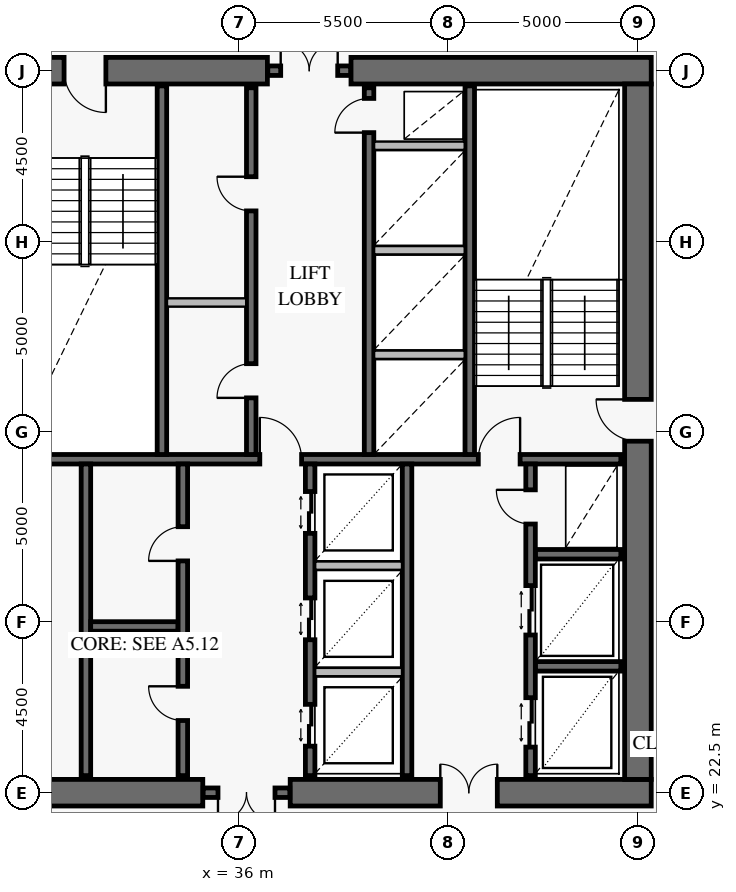
"""IFC4 building model, lengths in metres.
Left out: names, types, materials, properties, quantities, classifications, styles, units other than length and angle.
Written with IfcOpenShell. Run it as: python <this file> out.ifc"""

import sys

from ifc_helpers import new_model, si_unit, direction, frame, frame_2d, origin, place, context, subcontext, project, spatial, rectangle, extrude, element, fill, save


model = new_model("IFC4")
c1 = context("Model", 3, precision=1e-05, world=origin(), true_north=direction((0.0, 1.0)))
c2 = subcontext(c1, "Body", "Model", "MODEL_VIEW")
j1 = project(units=[si_unit("LENGTHUNIT", "METRE"), si_unit("PLANEANGLEUNIT", "RADIAN")], contexts=[c1])
p1 = place(None, origin())
s1 = spatial("IfcSite", under=j1, at=p1, CompositionType="ELEMENT")
p2 = place(p1, origin())
s2 = spatial("IfcBuilding", under=s1, at=p2, CompositionType="ELEMENT")
p3 = place(p2, frame((0.0, 0.0, 218.8)))
s3 = spatial("IfcBuildingStorey", under=s2, at=p3, CompositionType="ELEMENT", Elevation=218.8)
p4 = place(p3, frame((25.15, 22.5, 0.0), z_axis=(0.0, 0.0, 1.0), x_axis=(1.0, 0.0, 0.0)))
e1 = element("IfcWall", 1, at=p4, inside=s3, PredefinedType="SHEAR", context=c2, shape_type="SweptSolid", body=[
    extrude(rectangle(XDim=9.9, YDim=0.7, at=frame_2d((4.95, 0.0))), origin(), (0.0, 0.0, 1.0), 3.8),
])
p5 = place(p4, frame((4.25, 0.0, 0.0)))
e2 = element("IfcOpeningElement", 2, at=p5, cuts=e1, PredefinedType="OPENING", context=c2, shape_type="SweptSolid", body=[
    extrude(rectangle(XDim=1.5, YDim=2.15, at=frame_2d((0.75, 1.075))), frame((0.0, 0.362, 0.0), z_axis=(0.0, -1.0, 0.0), x_axis=(1.0, 0.0, 0.0)), (0.0, 0.0, 1.0), 0.724),
])
p6 = place(p3, frame((37.35, 22.5, 0.0), z_axis=(0.0, 0.0, 1.0), x_axis=(1.0, 0.0, 0.0)))
e3 = element("IfcWall", 3, at=p6, inside=s3, PredefinedType="SHEAR", context=c2, shape_type="SweptSolid", body=[
    extrude(rectangle(XDim=9.5, YDim=0.7, at=frame_2d((4.75, 0.0))), origin(), (0.0, 0.0, 1.0), 3.8),
])
p7 = place(p6, frame((3.95, 0.0, 0.0)))
e4 = element("IfcOpeningElement", 4, at=p7, cuts=e3, PredefinedType="OPENING", context=c2, shape_type="SweptSolid", body=[
    extrude(rectangle(XDim=1.5, YDim=2.15, at=frame_2d((0.75, 1.075))), frame((0.0, 0.362, 0.0), z_axis=(0.0, -1.0, 0.0), x_axis=(1.0, 0.0, 0.0)), (0.0, 0.0, 1.0), 0.724),
])
p8 = place(p3, frame((46.85, 41.5, 0.0), z_axis=(0.0, 0.0, 1.0), x_axis=(-1.0, 0.0, 0.0)))
e5 = element("IfcWall", 5, at=p8, inside=s3, PredefinedType="SHEAR", context=c2, shape_type="SweptSolid", body=[
    extrude(rectangle(XDim=7.9, YDim=0.7, at=frame_2d((3.95, 0.0))), origin(), (0.0, 0.0, 1.0), 3.8),
])
p9 = place(p3, frame((36.75, 41.5, 0.0), z_axis=(0.0, 0.0, 1.0), x_axis=(-1.0, 0.0, 0.0)))
e6 = element("IfcWall", 6, at=p9, inside=s3, PredefinedType="SHEAR", context=c2, shape_type="SweptSolid", body=[
    extrude(rectangle(XDim=11.6, YDim=0.7, at=frame_2d((5.8, 0.0))), origin(), (0.0, 0.0, 1.0), 3.8),
])
p10 = place(p9, frame((4.25, 0.0, 0.0)))
e7 = element("IfcOpeningElement", 7, at=p10, cuts=e6, PredefinedType="OPENING", context=c2, shape_type="SweptSolid", body=[
    extrude(rectangle(XDim=1.1, YDim=2.15, at=frame_2d((0.55, 1.075))), frame((0.0, 0.362, 0.0), z_axis=(0.0, -1.0, 0.0), x_axis=(1.0, 0.0, 0.0)), (0.0, 0.0, 1.0), 0.724),
])
p11 = place(p3, frame((46.5, 22.85, 0.0), z_axis=(0.0, 0.0, 1.0), x_axis=(0.0, 1.0, 0.0)))
e8 = element("IfcWall", 8, at=p11, inside=s3, PredefinedType="SHEAR", context=c2, shape_type="SweptSolid", body=[
    extrude(rectangle(XDim=18.3, YDim=0.7, at=frame_2d((9.15, 0.0))), origin(), (0.0, 0.0, 1.0), 3.8),
])
p12 = place(p11, frame((8.9, 0.0, 0.0)))
e9 = element("IfcOpeningElement", 9, at=p12, cuts=e8, PredefinedType="OPENING", context=c2, shape_type="SweptSolid", body=[
    extrude(rectangle(XDim=1.1, YDim=2.15, at=frame_2d((0.55, 1.075))), frame((0.0, 0.362, 0.0), z_axis=(0.0, -1.0, 0.0), x_axis=(1.0, 0.0, 0.0)), (0.0, 0.0, 1.0), 0.724),
])
p13 = place(p3, frame((35.06, 22.5, 0.0), z_axis=(0.0, 0.0, 1.0), x_axis=(1.0, 0.0, 0.0)))
e10 = element("IfcWall", 10, at=p13, inside=s3, PredefinedType="SOLIDWALL", context=c2, shape_type="SweptSolid", body=[
    extrude(rectangle(XDim=2.28, YDim=0.25, at=frame_2d((1.14, 0.0))), origin(), (0.0, 0.0, 1.0), 3.8),
])
p14 = place(p13, frame((0.39, 0.0, 0.0)))
e11 = element("IfcOpeningElement", 11, at=p14, cuts=e10, PredefinedType="OPENING", context=c2, shape_type="SweptSolid", body=[
    extrude(rectangle(XDim=1.5, YDim=2.15, at=frame_2d((0.75, 1.075))), frame((0.0, 0.137, 0.0), z_axis=(0.0, -1.0, 0.0), x_axis=(1.0, 0.0, 0.0)), (0.0, 0.0, 1.0), 0.274),
])
p15 = place(p3, frame((36.76, 41.5, 0.0), z_axis=(0.0, 0.0, 1.0), x_axis=(1.0, 0.0, 0.0)))
e12 = element("IfcWall", 12, at=p15, inside=s3, PredefinedType="SOLIDWALL", context=c2, shape_type="SweptSolid", body=[
    extrude(rectangle(XDim=2.18, YDim=0.25, at=frame_2d((1.09, 0.0))), origin(), (0.0, 0.0, 1.0), 3.8),
])
p16 = place(p15, frame((0.34, 0.0, 0.0)))
e13 = element("IfcOpeningElement", 13, at=p16, cuts=e12, PredefinedType="OPENING", context=c2, shape_type="SweptSolid", body=[
    extrude(rectangle(XDim=1.5, YDim=2.15, at=frame_2d((0.75, 1.075))), frame((0.0, 0.137, 0.0), z_axis=(0.0, -1.0, 0.0), x_axis=(1.0, 0.0, 0.0)), (0.0, 0.0, 1.0), 0.274),
])
p17 = place(p3, frame((25.95, 31.275, 0.0), z_axis=(0.0, 0.0, 1.0), x_axis=(1.0, 0.0, 0.0)))
e14 = element("IfcWall", 14, at=p17, inside=s3, PredefinedType="SOLIDWALL", context=c2, shape_type="SweptSolid", body=[
    extrude(rectangle(XDim=20.1, YDim=0.25, at=frame_2d((10.05, 0.0))), origin(), (0.0, 0.0, 1.0), 3.8),
])
p18 = place(p17, frame((2.6, 0.0, 0.0)))
e15 = element("IfcOpeningElement", 15, at=p18, cuts=e14, PredefinedType="OPENING", context=c2, shape_type="SweptSolid", body=[
    extrude(rectangle(XDim=1.1, YDim=2.15, at=frame_2d((0.55, 1.075))), frame((0.0, 0.137, 0.0), z_axis=(0.0, -1.0, 0.0), x_axis=(1.0, 0.0, 0.0)), (0.0, 0.0, 1.0), 0.274),
])
p19 = place(p17, frame((10.6, 0.0, 0.0)))
e16 = element("IfcOpeningElement", 16, at=p19, cuts=e14, PredefinedType="OPENING", context=c2, shape_type="SweptSolid", body=[
    extrude(rectangle(XDim=1.1, YDim=2.15, at=frame_2d((0.55, 1.075))), frame((0.0, 0.137, 0.0), z_axis=(0.0, -1.0, 0.0), x_axis=(1.0, 0.0, 0.0)), (0.0, 0.0, 1.0), 0.274),
])
p20 = place(p17, frame((16.35, 0.0, 0.0)))
e17 = element("IfcOpeningElement", 17, at=p20, cuts=e14, PredefinedType="OPENING", context=c2, shape_type="SweptSolid", body=[
    extrude(rectangle(XDim=1.1, YDim=2.15, at=frame_2d((0.55, 1.075))), frame((0.0, 0.137, 0.0), z_axis=(0.0, -1.0, 0.0), x_axis=(1.0, 0.0, 0.0)), (0.0, 0.0, 1.0), 0.274),
])
for number, where, z_axis, x_axis in (
    (18, (33.975, 31.4, 0.0), (0.0, 0.0, 1.0), (0.0, 1.0, 0.0)),
    (19, (42.075, 31.4, 0.0), (0.0, 0.0, 1.0), (0.0, 1.0, 0.0)),
):
    element("IfcWall", number, at=place(p3, frame(where, z_axis=z_axis, x_axis=x_axis)), inside=s3, PredefinedType="SOLIDWALL", context=c2, shape_type="SweptSolid", body=[
        extrude(rectangle(XDim=9.7, YDim=0.25, at=frame_2d((4.85, 0.0))), origin(), (0.0, 0.0, 1.0), 3.8),
    ])
p21 = place(p3, frame((36.325, 31.4, 0.0), z_axis=(0.0, 0.0, 1.0), x_axis=(0.0, 1.0, 0.0)))
e20 = element("IfcWall", 20, at=p21, inside=s3, PredefinedType="SOLIDWALL", context=c2, shape_type="SweptSolid", body=[
    extrude(rectangle(XDim=9.65, YDim=0.25, at=frame_2d((4.825, 0.0))), origin(), (0.0, 0.0, 1.0), 3.8),
])
p22 = place(p21, frame((1.49, 0.0, 0.0)))
e21 = element("IfcOpeningElement", 21, at=p22, cuts=e20, PredefinedType="OPENING", context=c2, shape_type="SweptSolid", body=[
    extrude(rectangle(XDim=0.9, YDim=2.1, at=frame_2d((0.45, 1.05))), frame((0.0, 0.137, 0.0), z_axis=(0.0, -1.0, 0.0), x_axis=(1.0, 0.0, 0.0)), (0.0, 0.0, 1.0), 0.274),
])
p23 = place(p21, frame((6.41, 0.0, 0.0)))
e22 = element("IfcOpeningElement", 22, at=p23, cuts=e20, PredefinedType="OPENING", context=c2, shape_type="SweptSolid", body=[
    extrude(rectangle(XDim=0.9, YDim=2.1, at=frame_2d((0.45, 1.05))), frame((0.0, 0.137, 0.0), z_axis=(0.0, -1.0, 0.0), x_axis=(1.0, 0.0, 0.0)), (0.0, 0.0, 1.0), 0.274),
])
p24 = place(p3, frame((39.425, 31.4, 0.0), z_axis=(0.0, 0.0, 1.0), x_axis=(0.0, 1.0, 0.0)))
e23 = element("IfcWall", 23, at=p24, inside=s3, PredefinedType="SOLIDWALL", context=c2, shape_type="SweptSolid", body=[
    extrude(rectangle(XDim=9.65, YDim=0.25, at=frame_2d((4.825, 0.0))), origin(), (0.0, 0.0, 1.0), 3.8),
])
p25 = place(p24, frame((8.47, 0.0, 0.0)))
e24 = element("IfcOpeningElement", 24, at=p25, cuts=e23, PredefinedType="OPENING", context=c2, shape_type="SweptSolid", body=[
    extrude(rectangle(XDim=0.9, YDim=2.1, at=frame_2d((0.45, 1.05))), frame((0.0, 0.137, 0.0), z_axis=(0.0, -1.0, 0.0), x_axis=(1.0, 0.0, 0.0)), (0.0, 0.0, 1.0), 0.274),
])
p26 = place(p3, frame((31.975, 22.95, 0.0), z_axis=(0.0, 0.0, 1.0), x_axis=(0.0, 1.0, 0.0)))
e25 = element("IfcWall", 25, at=p26, inside=s3, PredefinedType="SOLIDWALL", context=c2, shape_type="SweptSolid", body=[
    extrude(rectangle(XDim=8.2, YDim=0.25, at=frame_2d((4.1, 0.0))), origin(), (0.0, 0.0, 1.0), 3.8),
])
p27 = place(p3, frame((32.1, 26.875, 0.0), z_axis=(0.0, 0.0, 1.0), x_axis=(1.0, 0.0, 0.0)))
e26 = element("IfcWall", 26, at=p27, inside=s3, PredefinedType="SOLIDWALL", context=c2, shape_type="SweptSolid", body=[
    extrude(rectangle(XDim=2.3, YDim=0.25, at=frame_2d((1.15, 0.0))), origin(), (0.0, 0.0, 1.0), 3.8),
])
p28 = place(p3, frame((34.525, 22.95, 0.0), z_axis=(0.0, 0.0, 1.0), x_axis=(0.0, 1.0, 0.0)))
e27 = element("IfcWall", 27, at=p28, inside=s3, PredefinedType="SOLIDWALL", context=c2, shape_type="SweptSolid", body=[
    extrude(rectangle(XDim=8.2, YDim=0.25, at=frame_2d((4.1, 0.0))), origin(), (0.0, 0.0, 1.0), 3.8),
])
p29 = place(p28, frame((1.45, 0.0, 0.0)))
e28 = element("IfcOpeningElement", 28, at=p29, cuts=e27, PredefinedType="OPENING", context=c2, shape_type="SweptSolid", body=[
    extrude(rectangle(XDim=0.9, YDim=2.1, at=frame_2d((0.45, 1.05))), frame((0.0, 0.137, 0.0), z_axis=(0.0, -1.0, 0.0), x_axis=(1.0, 0.0, 0.0)), (0.0, 0.0, 1.0), 0.274),
])
p30 = place(p28, frame((5.65, 0.0, 0.0)))
e29 = element("IfcOpeningElement", 29, at=p30, cuts=e27, PredefinedType="OPENING", context=c2, shape_type="SweptSolid", body=[
    extrude(rectangle(XDim=0.9, YDim=2.1, at=frame_2d((0.45, 1.05))), frame((0.0, 0.137, 0.0), z_axis=(0.0, -1.0, 0.0), x_axis=(1.0, 0.0, 0.0)), (0.0, 0.0, 1.0), 0.274),
])
p31 = place(p3, frame((37.875, 22.95, 0.0), z_axis=(0.0, 0.0, 1.0), x_axis=(0.0, 1.0, 0.0)))
e30 = element("IfcWall", 30, at=p31, inside=s3, PredefinedType="SOLIDWALL", context=c2, shape_type="SweptSolid", body=[
    extrude(rectangle(XDim=8.2, YDim=0.25, at=frame_2d((4.1, 0.0))), origin(), (0.0, 0.0, 1.0), 3.8),
])
p32 = place(p31, frame((0.775, 0.0, 0.0)))
e31 = element("IfcOpeningElement", 31, at=p32, cuts=e30, PredefinedType="OPENING", context=c2, shape_type="SweptSolid", body=[
    extrude(rectangle(XDim=1.1, YDim=2.2, at=frame_2d((0.55, 1.1))), frame((0.0, 0.137, 0.0), z_axis=(0.0, -1.0, 0.0), x_axis=(1.0, 0.0, 0.0)), (0.0, 0.0, 1.0), 0.274),
])
p33 = place(p31, frame((3.575, 0.0, 0.0)))
e32 = element("IfcOpeningElement", 32, at=p33, cuts=e30, PredefinedType="OPENING", context=c2, shape_type="SweptSolid", body=[
    extrude(rectangle(XDim=1.1, YDim=2.2, at=frame_2d((0.55, 1.1))), frame((0.0, 0.137, 0.0), z_axis=(0.0, -1.0, 0.0), x_axis=(1.0, 0.0, 0.0)), (0.0, 0.0, 1.0), 0.274),
])
p34 = place(p31, frame((6.375, 0.0, 0.0)))
e33 = element("IfcOpeningElement", 33, at=p34, cuts=e30, PredefinedType="OPENING", context=c2, shape_type="SweptSolid", body=[
    extrude(rectangle(XDim=1.1, YDim=2.2, at=frame_2d((0.55, 1.1))), frame((0.0, 0.137, 0.0), z_axis=(0.0, -1.0, 0.0), x_axis=(1.0, 0.0, 0.0)), (0.0, 0.0, 1.0), 0.274),
])
p35 = place(p3, frame((40.425, 22.95, 0.0), z_axis=(0.0, 0.0, 1.0), x_axis=(0.0, 1.0, 0.0)))
e34 = element("IfcWall", 34, at=p35, inside=s3, PredefinedType="SOLIDWALL", context=c2, shape_type="SweptSolid", body=[
    extrude(rectangle(XDim=8.2, YDim=0.25, at=frame_2d((4.1, 0.0))), origin(), (0.0, 0.0, 1.0), 3.8),
])
for number, where, z_axis, x_axis in (
    (35, (43.8, 25.825, 0.0), (0.0, 0.0, 1.0), (1.0, 0.0, 0.0)),
    (36, (43.8, 28.775, 0.0), (0.0, 0.0, 1.0), (1.0, 0.0, 0.0)),
):
    element("IfcWall", number, at=place(p3, frame(where, z_axis=z_axis, x_axis=x_axis)), inside=s3, PredefinedType="SOLIDWALL", context=c2, shape_type="SweptSolid", body=[
        extrude(rectangle(XDim=2.25, YDim=0.25, at=frame_2d((1.125, 0.0))), origin(), (0.0, 0.0, 1.0), 3.8),
    ])
p36 = place(p3, frame((43.675, 22.95, 0.0), z_axis=(0.0, 0.0, 1.0), x_axis=(0.0, 1.0, 0.0)))
e37 = element("IfcWall", 37, at=p36, inside=s3, PredefinedType="SOLIDWALL", context=c2, shape_type="SweptSolid", body=[
    extrude(rectangle(XDim=8.2, YDim=0.25, at=frame_2d((4.1, 0.0))), origin(), (0.0, 0.0, 1.0), 3.8),
])
p37 = place(p36, frame((0.75, 0.0, 0.0)))
e38 = element("IfcOpeningElement", 38, at=p37, cuts=e37, PredefinedType="OPENING", context=c2, shape_type="SweptSolid", body=[
    extrude(rectangle(XDim=1.3, YDim=2.3, at=frame_2d((0.65, 1.15))), frame((0.0, 0.137, 0.0), z_axis=(0.0, -1.0, 0.0), x_axis=(1.0, 0.0, 0.0)), (0.0, 0.0, 1.0), 0.274),
])
p38 = place(p36, frame((3.7, 0.0, 0.0)))
e39 = element("IfcOpeningElement", 39, at=p38, cuts=e37, PredefinedType="OPENING", context=c2, shape_type="SweptSolid", body=[
    extrude(rectangle(XDim=1.3, YDim=2.3, at=frame_2d((0.65, 1.15))), frame((0.0, 0.137, 0.0), z_axis=(0.0, -1.0, 0.0), x_axis=(1.0, 0.0, 0.0)), (0.0, 0.0, 1.0), 0.274),
])
p39 = place(p36, frame((6.62, 0.0, 0.0)))
e40 = element("IfcOpeningElement", 40, at=p39, cuts=e37, PredefinedType="OPENING", context=c2, shape_type="SweptSolid", body=[
    extrude(rectangle(XDim=0.9, YDim=2.1, at=frame_2d((0.45, 1.05))), frame((0.0, 0.137, 0.0), z_axis=(0.0, -1.0, 0.0), x_axis=(1.0, 0.0, 0.0)), (0.0, 0.0, 1.0), 0.274),
])
p40 = place(p3, frame((34.108, 35.4, 0.0), z_axis=(0.0, 0.0, 1.0), x_axis=(1.0, 0.0, 0.0)))
e41 = element("IfcWall", 41, at=p40, inside=s3, PredefinedType="PARTITIONING", context=c2, shape_type="SweptSolid", body=[
    extrude(rectangle(XDim=2.084, YDim=0.22, at=frame_2d((1.042, 0.0))), origin(), (0.0, 0.0, 1.0), 3.55),
])
for number, where, z_axis, x_axis in (
    (42, (39.558, 34.025, 0.0), (0.0, 0.0, 1.0), (1.0, 0.0, 0.0)),
    (43, (39.558, 36.775, 0.0), (0.0, 0.0, 1.0), (1.0, 0.0, 0.0)),
    (44, (39.558, 39.525, 0.0), (0.0, 0.0, 1.0), (1.0, 0.0, 0.0)),
):
    element("IfcWall", number, at=place(p3, frame(where, z_axis=z_axis, x_axis=x_axis)), inside=s3, PredefinedType="PARTITIONING", context=c2, shape_type="SweptSolid", body=[
        extrude(rectangle(XDim=2.384, YDim=0.22, at=frame_2d((1.192, 0.0))), origin(), (0.0, 0.0, 1.0), 3.55),
    ])
for number, where, z_axis, x_axis in (
    (45, (38.008, 25.675, 0.0), (0.0, 0.0, 1.0), (1.0, 0.0, 0.0)),
    (46, (38.008, 28.475, 0.0), (0.0, 0.0, 1.0), (1.0, 0.0, 0.0)),
):
    element("IfcWall", number, at=place(p3, frame(where, z_axis=z_axis, x_axis=x_axis)), inside=s3, PredefinedType="PARTITIONING", context=c2, shape_type="SweptSolid", body=[
        extrude(rectangle(XDim=2.284, YDim=0.22, at=frame_2d((1.142, 0.0))), origin(), (0.0, 0.0, 1.0), 3.55),
    ])
p41 = place(p12, origin())
e47 = element("IfcDoor", 47, at=p41, inside=s3, OperationType="SINGLE_SWING_RIGHT", PredefinedType="USERDEFINED", context=c2, shape_type="SweptSolid", body=[
    extrude(rectangle(XDim=1.1, YDim=2.15, at=frame_2d((0.55, 1.075))), frame((0.0, 0.025, 0.0), z_axis=(0.0, -1.0, 0.0), x_axis=(1.0, 0.0, 0.0)), (0.0, 0.0, 1.0), 0.05),
])
fill(e9, e47)
p42 = place(p10, origin())
e48 = element("IfcDoor", 48, at=p42, inside=s3, OperationType="SINGLE_SWING_LEFT", PredefinedType="USERDEFINED", context=c2, shape_type="SweptSolid", body=[
    extrude(rectangle(XDim=1.1, YDim=2.15, at=frame_2d((0.55, 1.075))), frame((0.0, 0.025, 0.0), z_axis=(0.0, -1.0, 0.0), x_axis=(1.0, 0.0, 0.0)), (0.0, 0.0, 1.0), 0.05),
])
fill(e7, e48)
p43 = place(p7, origin())
e49 = element("IfcDoor", 49, at=p43, inside=s3, OperationType="DOUBLE_DOOR_SINGLE_SWING", PredefinedType="DOOR", context=c2, shape_type="SweptSolid", body=[
    extrude(rectangle(XDim=1.5, YDim=2.15, at=frame_2d((0.75, 1.075))), frame((0.0, 0.025, 0.0), z_axis=(0.0, -1.0, 0.0), x_axis=(1.0, 0.0, 0.0)), (0.0, 0.0, 1.0), 0.05),
])
fill(e4, e49)
p44 = place(p14, frame((1.5, 0.0, 0.0), z_axis=(0.0, 0.0, 1.0), x_axis=(-1.0, 0.0, 0.0)))
e50 = element("IfcDoor", 50, at=p44, inside=s3, OperationType="DOUBLE_DOOR_SINGLE_SWING", PredefinedType="DOOR", context=c2, shape_type="SweptSolid", body=[
    extrude(rectangle(XDim=1.5, YDim=2.15, at=frame_2d((0.75, 1.075))), frame((0.0, 0.025, 0.0), z_axis=(0.0, -1.0, 0.0), x_axis=(1.0, 0.0, 0.0)), (0.0, 0.0, 1.0), 0.05),
])
fill(e11, e50)
p45 = place(p16, origin())
e51 = element("IfcDoor", 51, at=p45, inside=s3, OperationType="DOUBLE_DOOR_SINGLE_SWING", PredefinedType="DOOR", context=c2, shape_type="SweptSolid", body=[
    extrude(rectangle(XDim=1.5, YDim=2.15, at=frame_2d((0.75, 1.075))), frame((0.0, 0.025, 0.0), z_axis=(0.0, -1.0, 0.0), x_axis=(1.0, 0.0, 0.0)), (0.0, 0.0, 1.0), 0.05),
])
fill(e13, e51)
p46 = place(p19, origin())
e52 = element("IfcDoor", 52, at=p46, inside=s3, OperationType="SINGLE_SWING_LEFT", PredefinedType="USERDEFINED", context=c2, shape_type="SweptSolid", body=[
    extrude(rectangle(XDim=1.1, YDim=2.15, at=frame_2d((0.55, 1.075))), frame((0.0, 0.025, 0.0), z_axis=(0.0, -1.0, 0.0), x_axis=(1.0, 0.0, 0.0)), (0.0, 0.0, 1.0), 0.05),
])
fill(e16, e52)
p47 = place(p20, origin())
e53 = element("IfcDoor", 53, at=p47, inside=s3, OperationType="SINGLE_SWING_RIGHT", PredefinedType="USERDEFINED", context=c2, shape_type="SweptSolid", body=[
    extrude(rectangle(XDim=1.1, YDim=2.15, at=frame_2d((0.55, 1.075))), frame((0.0, 0.025, 0.0), z_axis=(0.0, -1.0, 0.0), x_axis=(1.0, 0.0, 0.0)), (0.0, 0.0, 1.0), 0.05),
])
fill(e17, e53)
p48 = place(p22, origin())
e54 = element("IfcDoor", 54, at=p48, inside=s3, OperationType="SINGLE_SWING_LEFT", PredefinedType="DOOR", context=c2, shape_type="SweptSolid", body=[
    extrude(rectangle(XDim=0.9, YDim=2.1, at=frame_2d((0.45, 1.05))), frame((0.0, 0.025, 0.0), z_axis=(0.0, -1.0, 0.0), x_axis=(1.0, 0.0, 0.0)), (0.0, 0.0, 1.0), 0.05),
])
fill(e21, e54)
p49 = place(p23, origin())
e55 = element("IfcDoor", 55, at=p49, inside=s3, OperationType="SINGLE_SWING_RIGHT", PredefinedType="DOOR", context=c2, shape_type="SweptSolid", body=[
    extrude(rectangle(XDim=0.9, YDim=2.1, at=frame_2d((0.45, 1.05))), frame((0.0, 0.025, 0.0), z_axis=(0.0, -1.0, 0.0), x_axis=(1.0, 0.0, 0.0)), (0.0, 0.0, 1.0), 0.05),
])
fill(e22, e55)
p50 = place(p25, origin())
e56 = element("IfcDoor", 56, at=p50, inside=s3, OperationType="SINGLE_SWING_LEFT", PredefinedType="DOOR", context=c2, shape_type="SweptSolid", body=[
    extrude(rectangle(XDim=0.9, YDim=2.1, at=frame_2d((0.45, 1.05))), frame((0.0, 0.025, 0.0), z_axis=(0.0, -1.0, 0.0), x_axis=(1.0, 0.0, 0.0)), (0.0, 0.0, 1.0), 0.05),
])
fill(e24, e56)
p51 = place(p29, origin())
e57 = element("IfcDoor", 57, at=p51, inside=s3, OperationType="SINGLE_SWING_RIGHT", PredefinedType="DOOR", context=c2, shape_type="SweptSolid", body=[
    extrude(rectangle(XDim=0.9, YDim=2.1, at=frame_2d((0.45, 1.05))), frame((0.0, 0.025, 0.0), z_axis=(0.0, -1.0, 0.0), x_axis=(1.0, 0.0, 0.0)), (0.0, 0.0, 1.0), 0.05),
])
fill(e28, e57)
p52 = place(p30, origin())
e58 = element("IfcDoor", 58, at=p52, inside=s3, OperationType="SINGLE_SWING_LEFT", PredefinedType="DOOR", context=c2, shape_type="SweptSolid", body=[
    extrude(rectangle(XDim=0.9, YDim=2.1, at=frame_2d((0.45, 1.05))), frame((0.0, 0.025, 0.0), z_axis=(0.0, -1.0, 0.0), x_axis=(1.0, 0.0, 0.0)), (0.0, 0.0, 1.0), 0.05),
])
fill(e29, e58)
p53 = place(p32, origin())
e59 = element("IfcDoor", 59, at=p53, inside=s3, OperationType="DOUBLE_DOOR_SLIDING", PredefinedType="DOOR", context=c2, shape_type="SweptSolid", body=[
    extrude(rectangle(XDim=1.1, YDim=2.2, at=frame_2d((0.55, 1.1))), frame((0.0, 0.025, 0.0), z_axis=(0.0, -1.0, 0.0), x_axis=(1.0, 0.0, 0.0)), (0.0, 0.0, 1.0), 0.05),
])
fill(e31, e59)
p54 = place(p33, origin())
e60 = element("IfcDoor", 60, at=p54, inside=s3, OperationType="DOUBLE_DOOR_SLIDING", PredefinedType="DOOR", context=c2, shape_type="SweptSolid", body=[
    extrude(rectangle(XDim=1.1, YDim=2.2, at=frame_2d((0.55, 1.1))), frame((0.0, 0.025, 0.0), z_axis=(0.0, -1.0, 0.0), x_axis=(1.0, 0.0, 0.0)), (0.0, 0.0, 1.0), 0.05),
])
fill(e32, e60)
p55 = place(p34, origin())
e61 = element("IfcDoor", 61, at=p55, inside=s3, OperationType="DOUBLE_DOOR_SLIDING", PredefinedType="DOOR", context=c2, shape_type="SweptSolid", body=[
    extrude(rectangle(XDim=1.1, YDim=2.2, at=frame_2d((0.55, 1.1))), frame((0.0, 0.025, 0.0), z_axis=(0.0, -1.0, 0.0), x_axis=(1.0, 0.0, 0.0)), (0.0, 0.0, 1.0), 0.05),
])
fill(e33, e61)
p56 = place(p37, origin())
e62 = element("IfcDoor", 62, at=p56, inside=s3, OperationType="DOUBLE_DOOR_SLIDING", PredefinedType="DOOR", context=c2, shape_type="SweptSolid", body=[
    extrude(rectangle(XDim=1.3, YDim=2.3, at=frame_2d((0.65, 1.15))), frame((0.0, 0.025, 0.0), z_axis=(0.0, -1.0, 0.0), x_axis=(1.0, 0.0, 0.0)), (0.0, 0.0, 1.0), 0.05),
])
fill(e38, e62)
p57 = place(p38, origin())
e63 = element("IfcDoor", 63, at=p57, inside=s3, OperationType="DOUBLE_DOOR_SLIDING", PredefinedType="DOOR", context=c2, shape_type="SweptSolid", body=[
    extrude(rectangle(XDim=1.3, YDim=2.3, at=frame_2d((0.65, 1.15))), frame((0.0, 0.025, 0.0), z_axis=(0.0, -1.0, 0.0), x_axis=(1.0, 0.0, 0.0)), (0.0, 0.0, 1.0), 0.05),
])
fill(e39, e63)
p58 = place(p39, origin())
e64 = element("IfcDoor", 64, at=p58, inside=s3, OperationType="SINGLE_SWING_RIGHT", PredefinedType="DOOR", context=c2, shape_type="SweptSolid", body=[
    extrude(rectangle(XDim=0.9, YDim=2.1, at=frame_2d((0.45, 1.05))), frame((0.0, 0.025, 0.0), z_axis=(0.0, -1.0, 0.0), x_axis=(1.0, 0.0, 0.0)), (0.0, 0.0, 1.0), 0.05),
])
fill(e40, e64)
save(model, sys.argv[1])
